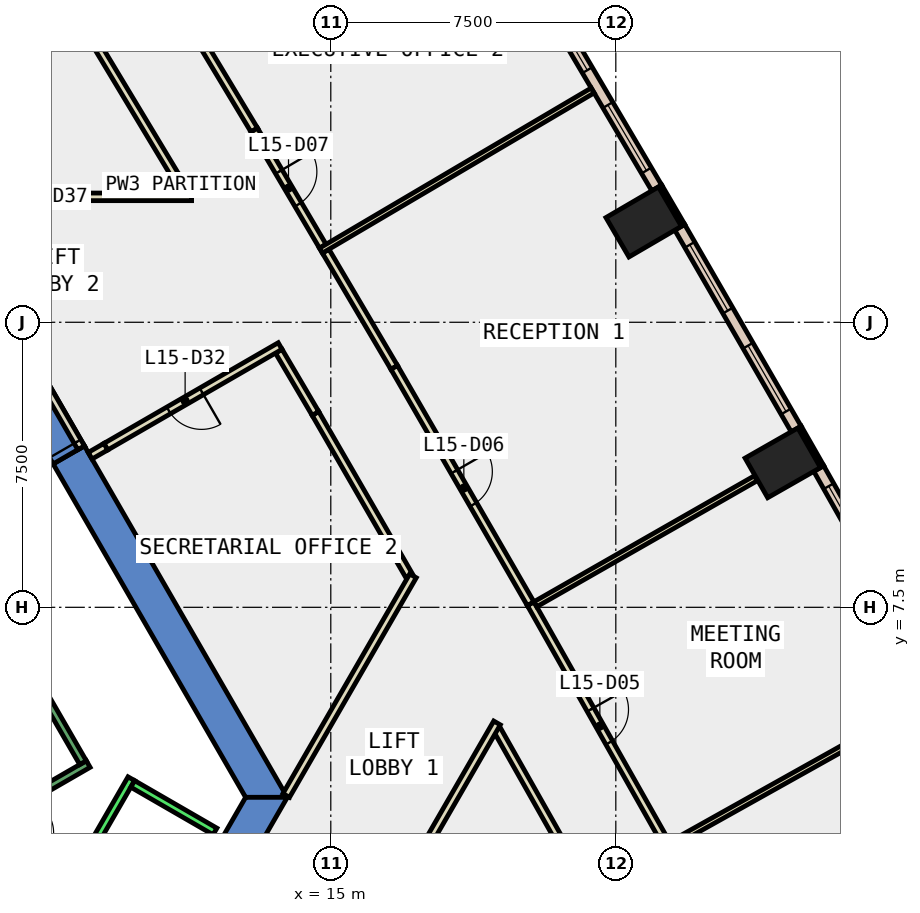
"""IFC4 building model, lengths in metres.
Left out: names, types, materials, properties, quantities, classifications, styles, units other than length and angle.
Written with IfcOpenShell. Run it as: python <this file> out.ifc"""

import sys

from ifc_helpers import new_model, si_unit, direction, frame, frame_2d, origin, origin_2d, place, context, subcontext, project, spatial, polyline, rectangle, outline, extrude, element, fill, save


model = new_model("IFC4")
c1 = context("Model", 3, precision=1e-05, world=origin(), true_north=direction((0.0, 1.0)))
c2 = subcontext(c1, "Body", "Model", "MODEL_VIEW")
j1 = project(units=[si_unit("LENGTHUNIT", "METRE"), si_unit("PLANEANGLEUNIT", "RADIAN")], contexts=[c1])
p1 = place(None, origin())
s1 = spatial("IfcSite", under=j1, at=p1, CompositionType="ELEMENT")
p2 = place(p1, origin())
s2 = spatial("IfcBuilding", under=s1, at=p2, CompositionType="ELEMENT")
p3 = place(p2, frame((0.0, 0.0, 72.8)))
s3 = spatial("IfcBuildingStorey", under=s2, at=p3, CompositionType="ELEMENT", Elevation=72.8)
for number, where, z_axis, x_axis in (
    (1, (26.894, 11.301, -0.4), (0.0, 0.0, 1.0), (-0.496, 0.869, 0.0)),
    (2, (23.234, 17.64, -0.4), (0.0, 0.0, 1.0), (-0.504, 0.864, 0.0)),
):
    element("IfcColumn", number, at=place(p3, frame(where, z_axis=z_axis, x_axis=x_axis)), inside=s3, PredefinedType="COLUMN", context=c2, shape_type="SweptSolid", body=[
        extrude(rectangle(XDim=1.2, YDim=1.6, at=origin_2d()), origin(), (0.0, 0.0, 1.0), 4.2),
    ])
p4 = place(p3, frame((0.0, 0.0, -0.4)))
e3 = element("IfcWall", 3, at=p4, inside=s3, PredefinedType="SHEAR", context=c2, shape_type="SweptSolid", body=[
    extrude(outline(polyline([(8.517, 11.748), (7.694, 11.273), (12.759, 2.5), (13.856, 2.5), (8.517, 11.748)])), origin(), (0.0, 0.0, 1.0), 4.2),
])
p5 = place(p3, frame((0.0, 0.0, 3.6)))
e4 = element("IfcWall", 4, at=p5, inside=s3, PredefinedType="SHEAR", context=c2, shape_type="SweptSolid", body=[
    extrude(outline(polyline([(7.517, 13.48), (6.695, 13.005), (7.694, 11.273), (8.517, 11.748), (7.517, 13.48)])), origin(), (0.0, 0.0, 1.0), 0.2),
])
p6 = place(p3, frame((0.0, 0.0, -0.4)))
e5 = element("IfcWall", 5, at=p6, inside=s3, PredefinedType="SHEAR", context=c2, shape_type="SweptSolid", body=[
    extrude(outline(polyline([(11.844, 0.915), (12.667, 0.44), (13.856, 2.5), (12.759, 2.5), (11.844, 0.915)])), origin(), (0.0, 0.0, 1.0), 4.2),
])
p7 = place(p3, frame((27.93, 11.201, 0.0), z_axis=(0.0, 0.0, 1.0), x_axis=(-0.495854054996, 0.868405870629, 0.0)))
e6 = element("IfcWall", 6, at=p7, inside=s3, PredefinedType="STANDARD", context=c2, shape_type="SweptSolid", body=[
    extrude(rectangle(XDim=1.2, YDim=0.1, at=frame_2d((0.6, 0.0))), origin(), (0.0, 0.0, 1.0), 3.8),
])
p8 = place(p3, frame((24.27, 17.551, 0.0), z_axis=(0.0, 0.0, 1.0), x_axis=(-0.504313844903, 0.863520437418, 0.0)))
e7 = element("IfcWall", 7, at=p8, inside=s3, PredefinedType="STANDARD", context=c2, shape_type="SweptSolid", body=[
    extrude(rectangle(XDim=1.2, YDim=0.1, at=frame_2d((0.6, 0.0))), origin(), (0.0, 0.0, 1.0), 3.8),
])
p9 = place(p3, frame((30.857, 5.814, 0.0), z_axis=(0.0, 0.0, 1.0), x_axis=(-0.492097935349, 0.870539845168, 0.0)))
e8 = element("IfcWall", 8, at=p9, inside=s3, PredefinedType="STANDARD", context=c2, shape_type="SweptSolid", body=[
    extrude(rectangle(XDim=6.131, YDim=0.3, at=frame_2d((3.065, 0.0))), origin(), (0.0, 0.0, 1.0), 3.8),
])
p10 = place(p9, frame((0.533, 0.0, 0.9)))
e9 = element("IfcOpeningElement", 9, at=p10, cuts=e8, PredefinedType="OPENING", context=c2, shape_type="SweptSolid", body=[
    extrude(rectangle(XDim=2.0, YDim=2.6, at=frame_2d((1.0, 1.3))), frame((0.0, 0.16, 0.0), z_axis=(0.0, -1.0, 0.0), x_axis=(1.0, 0.0, 0.0)), (0.0, 0.0, 1.0), 0.32),
])
p11 = place(p9, frame((3.598, 0.0, 0.9)))
e10 = element("IfcOpeningElement", 10, at=p11, cuts=e8, PredefinedType="OPENING", context=c2, shape_type="SweptSolid", body=[
    extrude(rectangle(XDim=2.0, YDim=2.6, at=frame_2d((1.0, 1.3))), frame((0.0, 0.16, 0.0), z_axis=(0.0, -1.0, 0.0), x_axis=(1.0, 0.0, 0.0)), (0.0, 0.0, 1.0), 0.32),
])
p12 = place(p3, frame((27.246, 12.191, 0.0), z_axis=(0.0, 0.0, 1.0), x_axis=(-0.499998239139, 0.866026420416, 0.0)))
e11 = element("IfcWall", 11, at=p12, inside=s3, PredefinedType="STANDARD", context=c2, shape_type="SweptSolid", body=[
    extrude(rectangle(XDim=6.13, YDim=0.3, at=frame_2d((3.065, 0.0))), origin(), (0.0, 0.0, 1.0), 3.8),
])
p13 = place(p12, frame((0.533, 0.0, 0.9)))
e12 = element("IfcOpeningElement", 12, at=p13, cuts=e11, PredefinedType="OPENING", context=c2, shape_type="SweptSolid", body=[
    extrude(rectangle(XDim=2.0, YDim=2.6, at=frame_2d((1.0, 1.3))), frame((0.0, 0.16, 0.0), z_axis=(0.0, -1.0, 0.0), x_axis=(1.0, 0.0, 0.0)), (0.0, 0.0, 1.0), 0.32),
])
p14 = place(p12, frame((3.598, 0.0, 0.9)))
e13 = element("IfcOpeningElement", 13, at=p14, cuts=e11, PredefinedType="OPENING", context=c2, shape_type="SweptSolid", body=[
    extrude(rectangle(XDim=2.0, YDim=2.6, at=frame_2d((1.0, 1.3))), frame((0.0, 0.16, 0.0), z_axis=(0.0, -1.0, 0.0), x_axis=(1.0, 0.0, 0.0)), (0.0, 0.0, 1.0), 0.32),
])
p15 = place(p3, frame((23.577, 18.534, 0.0), z_axis=(0.0, 0.0, 1.0), x_axis=(-0.507716058644, 0.861524465001, 0.0)))
e14 = element("IfcWall", 14, at=p15, inside=s3, PredefinedType="STANDARD", context=c2, shape_type="SweptSolid", body=[
    extrude(rectangle(XDim=6.131, YDim=0.3, at=frame_2d((3.065, 0.0))), origin(), (0.0, 0.0, 1.0), 3.8),
])
p16 = place(p15, frame((0.533, 0.0, 0.9)))
e15 = element("IfcOpeningElement", 15, at=p16, cuts=e14, PredefinedType="OPENING", context=c2, shape_type="SweptSolid", body=[
    extrude(rectangle(XDim=2.0, YDim=2.6, at=frame_2d((1.0, 1.3))), frame((0.0, 0.16, 0.0), z_axis=(0.0, -1.0, 0.0), x_axis=(1.0, 0.0, 0.0)), (0.0, 0.0, 1.0), 0.32),
])
p17 = place(p15, frame((3.598, 0.0, 0.9)))
e16 = element("IfcOpeningElement", 16, at=p17, cuts=e14, PredefinedType="OPENING", context=c2, shape_type="SweptSolid", body=[
    extrude(rectangle(XDim=2.0, YDim=2.6, at=frame_2d((1.0, 1.3))), frame((0.0, 0.16, 0.0), z_axis=(0.0, -1.0, 0.0), x_axis=(1.0, 0.0, 0.0)), (0.0, 0.0, 1.0), 0.32),
])
p18 = place(p3, frame((17.063, 8.328, 0.0), z_axis=(0.0, 0.0, 1.0), x_axis=(-0.499986575203, 0.866033154456, 0.0)))
e17 = element("IfcWall", 17, at=p18, inside=s3, PredefinedType="PARTITIONING", context=c2, shape_type="SweptSolid", body=[
    extrude(rectangle(XDim=4.934, YDim=0.2, at=frame_2d((2.467, 0.0))), origin(), (0.0, 0.0, 1.0), 3.8),
])
p19 = place(p3, frame((14.596, 12.601, 0.0), z_axis=(0.0, 0.0, 1.0), x_axis=(-0.507547610008, 0.861623713447, 0.0)))
e18 = element("IfcWall", 18, at=p19, inside=s3, PredefinedType="PARTITIONING", context=c2, shape_type="SweptSolid", body=[
    extrude(rectangle(XDim=1.901, YDim=0.2, at=frame_2d((0.95, 0.0))), origin(), (0.0, 0.0, 1.0), 3.8),
])
p20 = place(p3, frame((13.667, 14.375, 0.0), z_axis=(0.0, 0.0, 1.0), x_axis=(-0.866016748302, -0.500014991436, 0.0)))
e19 = element("IfcWall", 19, at=p20, inside=s3, PredefinedType="PARTITIONING", context=c2, shape_type="SweptSolid", body=[
    extrude(rectangle(XDim=5.298, YDim=0.2, at=frame_2d((2.649, 0.0))), origin(), (0.0, 0.0, 1.0), 3.8),
])
p21 = place(p20, frame((2.387, 0.0, 0.0)))
e20 = element("IfcOpeningElement", 20, at=p21, cuts=e19, PredefinedType="OPENING", context=c2, shape_type="SweptSolid", body=[
    extrude(rectangle(XDim=1.0, YDim=2.1, at=frame_2d((0.5, 1.05))), frame((0.0, 0.11, 0.0), z_axis=(0.0, -1.0, 0.0), x_axis=(1.0, 0.0, 0.0)), (0.0, 0.0, 1.0), 0.22),
])
p22 = place(p3, frame((11.186, 18.386, 0.0), z_axis=(0.0, 0.0, 1.0), x_axis=(-0.507247363226, 0.861800506208, 0.0)))
e21 = element("IfcWall", 21, at=p22, inside=s3, PredefinedType="PARTITIONING", context=c2, shape_type="SweptSolid", body=[
    extrude(rectangle(XDim=0.516, YDim=0.2, at=frame_2d((0.258, 0.0))), origin(), (0.0, 0.0, 1.0), 3.8),
])
p23 = place(p3, frame((10.924, 18.831, 0.0), z_axis=(0.0, 0.0, 1.0), x_axis=(-0.515797941416, 0.856710268195, 0.0)))
e22 = element("IfcWall", 22, at=p23, inside=s3, PredefinedType="PARTITIONING", context=c2, shape_type="SweptSolid", body=[
    extrude(rectangle(XDim=6.283, YDim=0.2, at=frame_2d((3.142, 0.0))), origin(), (0.0, 0.0, 1.0), 3.8),
])
p24 = place(p3, frame((21.77, 0.046, 0.0), z_axis=(0.0, 0.0, 1.0), x_axis=(-0.492148137455, 0.870511465059, 0.0)))
e23 = element("IfcWall", 23, at=p24, inside=s3, PredefinedType="PARTITIONING", context=c2, shape_type="SweptSolid", body=[
    extrude(rectangle(XDim=4.868, YDim=0.2, at=frame_2d((2.434, 0.0))), origin(), (0.0, 0.0, 1.0), 3.8),
])
p25 = place(p3, frame((20.259, 7.596, 0.0), z_axis=(0.0, 0.0, 1.0), x_axis=(0.492021755503, -0.870582903641, 0.0)))
e24 = element("IfcWall", 24, at=p25, inside=s3, PredefinedType="PARTITIONING", context=c2, shape_type="SweptSolid", body=[
    extrude(rectangle(XDim=7.251, YDim=0.2, at=frame_2d((3.626, 0.0))), origin(), (0.0, 0.0, 1.0), 3.8),
])
p26 = place(p25, frame((3.201, 0.0, 0.0)))
e25 = element("IfcOpeningElement", 25, at=p26, cuts=e24, PredefinedType="OPENING", context=c2, shape_type="SweptSolid", body=[
    extrude(rectangle(XDim=1.0, YDim=2.1, at=frame_2d((0.5, 1.05))), frame((0.0, 0.11, 0.0), z_axis=(0.0, -1.0, 0.0), x_axis=(1.0, 0.0, 0.0)), (0.0, 0.0, 1.0), 0.22),
])
p27 = place(p3, frame((14.865, 16.871, 0.0), z_axis=(0.0, 0.0, 1.0), x_axis=(0.507839876831, -0.861451484125, 0.0)))
e26 = element("IfcWall", 26, at=p27, inside=s3, PredefinedType="PARTITIONING", context=c2, shape_type="SweptSolid", body=[
    extrude(rectangle(XDim=3.552, YDim=0.2, at=frame_2d((1.776, 0.0))), origin(), (0.0, 0.0, 1.0), 3.8),
])
p28 = place(p3, frame((16.669, 13.811, 0.0), z_axis=(0.0, 0.0, 1.0), x_axis=(0.500027672765, -0.866009426316, 0.0)))
e27 = element("IfcWall", 27, at=p28, inside=s3, PredefinedType="PARTITIONING", context=c2, shape_type="SweptSolid", body=[
    extrude(rectangle(XDim=7.178, YDim=0.2, at=frame_2d((3.589, 0.0))), origin(), (0.0, 0.0, 1.0), 3.8),
])
p29 = place(p28, frame((3.164, 0.0, 0.0)))
e28 = element("IfcOpeningElement", 28, at=p29, cuts=e27, PredefinedType="OPENING", context=c2, shape_type="SweptSolid", body=[
    extrude(rectangle(XDim=1.0, YDim=2.1, at=frame_2d((0.5, 1.05))), frame((0.0, 0.11, 0.0), z_axis=(0.0, -1.0, 0.0), x_axis=(1.0, 0.0, 0.0)), (0.0, 0.0, 1.0), 0.22),
])
p30 = place(p3, frame((11.156, 23.1, 0.0), z_axis=(0.0, 0.0, 1.0), x_axis=(0.515628270719, -0.856812398623, 0.0)))
e29 = element("IfcWall", 29, at=p30, inside=s3, PredefinedType="PARTITIONING", context=c2, shape_type="SweptSolid", body=[
    extrude(rectangle(XDim=3.549, YDim=0.2, at=frame_2d((1.775, 0.0))), origin(), (0.0, 0.0, 1.0), 3.8),
])
p31 = place(p3, frame((12.986, 20.059, 0.0), z_axis=(0.0, 0.0, 1.0), x_axis=(0.507876424268, -0.861429937762, 0.0)))
e30 = element("IfcWall", 30, at=p31, inside=s3, PredefinedType="PARTITIONING", context=c2, shape_type="SweptSolid", body=[
    extrude(rectangle(XDim=3.55, YDim=0.2, at=frame_2d((1.775, 0.0))), origin(), (0.0, 0.0, 1.0), 3.8),
])
p32 = place(p31, frame((1.275, 0.0, 0.0)))
e31 = element("IfcOpeningElement", 31, at=p32, cuts=e30, PredefinedType="OPENING", context=c2, shape_type="SweptSolid", body=[
    extrude(rectangle(XDim=1.0, YDim=2.1, at=frame_2d((0.5, 1.05))), frame((0.0, 0.11, 0.0), z_axis=(0.0, -1.0, 0.0), x_axis=(1.0, 0.0, 0.0)), (0.0, 0.0, 1.0), 0.22),
])
p33 = place(p3, frame((6.25, 1.894, 0.0), z_axis=(0.0, 0.0, 1.0), x_axis=(0.866043184279, -0.499969202016, 0.0)))
e32 = element("IfcWall", 32, at=p33, inside=s3, PredefinedType="PARTITIONING", context=c2, shape_type="SweptSolid", body=[
    extrude(rectangle(XDim=2.084, YDim=0.2, at=frame_2d((1.042, 0.0))), origin(), (0.0, 0.0, 1.0), 3.8),
])
p34 = place(p33, frame((0.642, 0.0, 0.0)))
e33 = element("IfcOpeningElement", 33, at=p34, cuts=e32, PredefinedType="OPENING", context=c2, shape_type="SweptSolid", body=[
    extrude(rectangle(XDim=0.9, YDim=2.1, at=frame_2d((0.45, 1.05))), frame((0.0, 0.11, 0.0), z_axis=(0.0, -1.0, 0.0), x_axis=(1.0, 0.0, 0.0)), (0.0, 0.0, 1.0), 0.22),
])
p35 = place(p3, frame((13.827, 2.55, 0.0), z_axis=(0.0, 0.0, 1.0), x_axis=(0.500039204794, 0.866002767703, 0.0)))
e34 = element("IfcWall", 34, at=p35, inside=s3, PredefinedType="PARTITIONING", context=c2, shape_type="SweptSolid", body=[
    extrude(rectangle(XDim=6.672, YDim=0.2, at=frame_2d((3.336, 0.0))), origin(), (0.0, 0.0, 1.0), 3.8),
])
p36 = place(p3, frame((19.374, 4.458, 0.0), z_axis=(0.0, 0.0, 1.0), x_axis=(-0.499973880856, -0.866040483154, 0.0)))
e35 = element("IfcWall", 35, at=p36, inside=s3, PredefinedType="PARTITIONING", context=c2, shape_type="SweptSolid", body=[
    extrude(rectangle(XDim=13.113, YDim=0.2, at=frame_2d((6.556, 0.0))), origin(), (0.0, 0.0, 1.0), 3.8),
])
p37 = place(p3, frame((23.951, 1.266, 0.0), z_axis=(0.0, 0.0, 1.0), x_axis=(0.872786908026, 0.488101437385, 0.0)))
e36 = element("IfcWall", 36, at=p37, inside=s3, PredefinedType="PARTITIONING", context=c2, shape_type="SweptSolid", body=[
    extrude(rectangle(XDim=6.681, YDim=0.15, at=frame_2d((3.34, 0.0))), origin(), (0.0, 0.0, 1.0), 3.8),
])
p38 = place(p3, frame((20.382, 7.58, 0.0), z_axis=(0.0, 0.0, 1.0), x_axis=(0.868256636797, 0.496115321935, 0.0)))
e37 = element("IfcWall", 37, at=p38, inside=s3, PredefinedType="PARTITIONING", context=c2, shape_type="SweptSolid", body=[
    extrude(rectangle(XDim=6.68, YDim=0.15, at=frame_2d((3.34, 0.0))), origin(), (0.0, 0.0, 1.0), 3.8),
])
p39 = place(p3, frame((14.741, 16.885, 0.0), z_axis=(0.0, 0.0, 1.0), x_axis=(0.861505144806, 0.507748840936, 0.0)))
e38 = element("IfcWall", 38, at=p39, inside=s3, PredefinedType="PARTITIONING", context=c2, shape_type="SweptSolid", body=[
    extrude(rectangle(XDim=8.3, YDim=0.15, at=frame_2d((4.15, 0.0))), origin(), (0.0, 0.0, 1.0), 3.8),
])
p40 = place(p3, frame((8.43, 11.698, 0.0), z_axis=(0.0, 0.0, 1.0), x_axis=(-0.50002537861, 0.866010750942, 0.0)))
e39 = element("IfcWall", 39, at=p40, inside=s3, PredefinedType="PARTITIONING", context=c2, shape_type="SweptSolid", body=[
    extrude(rectangle(XDim=2.0, YDim=0.2, at=frame_2d((1.0, 0.0))), origin(), (0.0, 0.0, 1.0), 2.4),
])
p41 = place(p40, frame((0.19, 0.0, 0.0)))
e40 = element("IfcOpeningElement", 40, at=p41, cuts=e39, PredefinedType="OPENING", context=c2, shape_type="SweptSolid", body=[
    extrude(rectangle(XDim=1.8, YDim=2.1, at=frame_2d((0.9, 1.05))), frame((0.0, 0.11, 0.0), z_axis=(0.0, -1.0, 0.0), x_axis=(1.0, 0.0, 0.0)), (0.0, 0.0, 1.0), 0.22),
])
p42 = place(p3, frame((0.4, 18.3, 0.0), z_axis=(0.0, 0.0, 1.0), x_axis=(1.0, 0.0, 0.0)))
e41 = element("IfcWall", 41, at=p42, inside=s3, PredefinedType="PARTITIONING", context=c2, shape_type="SweptSolid", body=[
    extrude(rectangle(XDim=10.937, YDim=0.2, at=frame_2d((5.469, 0.0))), origin(), (0.0, 0.0, 1.0), 3.8),
])
p43 = place(p42, frame((3.333, 0.0, 0.0)))
e42 = element("IfcOpeningElement", 42, at=p43, cuts=e41, PredefinedType="OPENING", context=c2, shape_type="SweptSolid", body=[
    extrude(rectangle(XDim=1.0, YDim=2.1, at=frame_2d((0.5, 1.05))), frame((0.0, 0.11, 0.0), z_axis=(0.0, -1.0, 0.0), x_axis=(1.0, 0.0, 0.0)), (0.0, 0.0, 1.0), 0.22),
])
p44 = place(p42, frame((4.433, 0.0, 0.0)))
e43 = element("IfcOpeningElement", 43, at=p44, cuts=e41, PredefinedType="OPENING", context=c2, shape_type="SweptSolid", body=[
    extrude(rectangle(XDim=1.0, YDim=2.1, at=frame_2d((0.5, 1.05))), frame((0.0, 0.11, 0.0), z_axis=(0.0, -1.0, 0.0), x_axis=(1.0, 0.0, 0.0)), (0.0, 0.0, 1.0), 0.22),
])
p45 = place(p3, frame((9.079, 11.726, 0.0), z_axis=(0.0, 0.0, 1.0), x_axis=(-0.865929261247, -0.500166486798, 0.0)))
e44 = element("IfcWall", 44, at=p45, inside=s3, PredefinedType="PARTITIONING", context=c2, shape_type="SweptSolid", body=[
    extrude(rectangle(XDim=0.476, YDim=0.2, at=frame_2d((0.238, 0.0))), origin(), (0.0, 0.0, 1.0), 2.4),
])
p46 = place(p3, frame((4.451, -6.19, 0.0), z_axis=(0.0, 0.0, 1.0), x_axis=(0.50000090737, 0.866024879913, 0.0)))
e45 = element("IfcWall", 45, at=p46, inside=s3, PredefinedType="STANDARD", context=c2, shape_type="SweptSolid", body=[
    extrude(rectangle(XDim=10.6, YDim=0.2, at=frame_2d((5.3, 0.0))), origin(), (0.0, 0.0, 1.0), 3.8),
])
p47 = place(p3, frame((9.788, 2.853, 0.0), z_axis=(0.0, 0.0, 1.0), x_axis=(0.865998541277, -0.500046524342, 0.0)))
e46 = element("IfcWall", 46, at=p47, inside=s3, PredefinedType="STANDARD", context=c2, shape_type="SweptSolid", body=[
    extrude(rectangle(XDim=2.5, YDim=0.2, at=frame_2d((1.25, 0.0))), origin(), (0.0, 0.0, 1.0), 3.8),
])
p48 = place(p3, frame((4.806, 1.176, 0.0), z_axis=(0.0, 0.0, 1.0), x_axis=(0.866059941101, 0.499940174841, 0.0)))
e47 = element("IfcWall", 47, at=p48, inside=s3, PredefinedType="STANDARD", context=c2, shape_type="SweptSolid", body=[
    extrude(rectangle(XDim=4.4, YDim=0.2, at=frame_2d((2.2, 0.0))), origin(), (0.0, 0.0, 1.0), 3.8),
])
p49 = place(p48, frame((1.65, 0.0, 0.0)))
e48 = element("IfcOpeningElement", 48, at=p49, cuts=e47, PredefinedType="OPENING", context=c2, shape_type="SweptSolid", body=[
    extrude(rectangle(XDim=1.1, YDim=2.2, at=frame_2d((0.55, 1.1))), frame((0.0, 0.11, 0.0), z_axis=(0.0, -1.0, 0.0), x_axis=(1.0, 0.0, 0.0)), (0.0, 0.0, 1.0), 0.22),
])
p50 = place(p3, frame((8.48, 3.412, 0.0), z_axis=(0.0, 0.0, 1.0), x_axis=(-0.499978703459, 0.866037698999, 0.0)))
e49 = element("IfcWall", 49, at=p50, inside=s3, PredefinedType="STANDARD", context=c2, shape_type="SweptSolid", body=[
    extrude(rectangle(XDim=6.9, YDim=0.2, at=frame_2d((3.45, 0.0))), origin(), (0.0, 0.0, 1.0), 3.8),
])
p51 = place(p11, origin())
e50 = element("IfcWindow", 50, at=p51, inside=s3, PartitioningType="SINGLE_PANEL", PredefinedType="WINDOW", context=c2, shape_type="SweptSolid", body=[
    extrude(rectangle(XDim=2.0, YDim=2.6, at=frame_2d((1.0, 1.3))), frame((0.0, 0.03, 0.0), z_axis=(0.0, -1.0, 0.0), x_axis=(1.0, 0.0, 0.0)), (0.0, 0.0, 1.0), 0.06),
])
fill(e10, e50)
p52 = place(p13, origin())
e51 = element("IfcWindow", 51, at=p52, inside=s3, PartitioningType="SINGLE_PANEL", PredefinedType="WINDOW", context=c2, shape_type="SweptSolid", body=[
    extrude(rectangle(XDim=2.0, YDim=2.6, at=frame_2d((1.0, 1.3))), frame((0.0, 0.03, 0.0), z_axis=(0.0, -1.0, 0.0), x_axis=(1.0, 0.0, 0.0)), (0.0, 0.0, 1.0), 0.06),
])
fill(e12, e51)
p53 = place(p14, origin())
e52 = element("IfcWindow", 52, at=p53, inside=s3, PartitioningType="SINGLE_PANEL", PredefinedType="WINDOW", context=c2, shape_type="SweptSolid", body=[
    extrude(rectangle(XDim=2.0, YDim=2.6, at=frame_2d((1.0, 1.3))), frame((0.0, 0.03, 0.0), z_axis=(0.0, -1.0, 0.0), x_axis=(1.0, 0.0, 0.0)), (0.0, 0.0, 1.0), 0.06),
])
fill(e13, e52)
p54 = place(p16, origin())
e53 = element("IfcWindow", 53, at=p54, inside=s3, PartitioningType="SINGLE_PANEL", PredefinedType="WINDOW", context=c2, shape_type="SweptSolid", body=[
    extrude(rectangle(XDim=2.0, YDim=2.6, at=frame_2d((1.0, 1.3))), frame((0.0, 0.03, 0.0), z_axis=(0.0, -1.0, 0.0), x_axis=(1.0, 0.0, 0.0)), (0.0, 0.0, 1.0), 0.06),
])
fill(e15, e53)
p55 = place(p17, origin())
e54 = element("IfcWindow", 54, at=p55, inside=s3, PartitioningType="SINGLE_PANEL", PredefinedType="WINDOW", context=c2, shape_type="SweptSolid", body=[
    extrude(rectangle(XDim=2.0, YDim=2.6, at=frame_2d((1.0, 1.3))), frame((0.0, 0.03, 0.0), z_axis=(0.0, -1.0, 0.0), x_axis=(1.0, 0.0, 0.0)), (0.0, 0.0, 1.0), 0.06),
])
fill(e16, e54)
p56 = place(p26, origin())
e55 = element("IfcDoor", 55, at=p56, inside=s3, OperationType="SINGLE_SWING_LEFT", PredefinedType="DOOR", context=c2, shape_type="SweptSolid", body=[
    extrude(rectangle(XDim=1.0, YDim=2.1, at=frame_2d((0.5, 1.05))), frame((0.0, 0.025, 0.0), z_axis=(0.0, -1.0, 0.0), x_axis=(1.0, 0.0, 0.0)), (0.0, 0.0, 1.0), 0.05),
])
fill(e25, e55)
p57 = place(p29, origin())
e56 = element("IfcDoor", 56, at=p57, inside=s3, OperationType="SINGLE_SWING_LEFT", PredefinedType="DOOR", context=c2, shape_type="SweptSolid", body=[
    extrude(rectangle(XDim=1.0, YDim=2.1, at=frame_2d((0.5, 1.05))), frame((0.0, 0.025, 0.0), z_axis=(0.0, -1.0, 0.0), x_axis=(1.0, 0.0, 0.0)), (0.0, 0.0, 1.0), 0.05),
])
fill(e28, e56)
p58 = place(p32, origin())
e57 = element("IfcDoor", 57, at=p58, inside=s3, OperationType="SINGLE_SWING_RIGHT", PredefinedType="DOOR", context=c2, shape_type="SweptSolid", body=[
    extrude(rectangle(XDim=1.0, YDim=2.1, at=frame_2d((0.5, 1.05))), frame((0.0, 0.025, 0.0), z_axis=(0.0, -1.0, 0.0), x_axis=(1.0, 0.0, 0.0)), (0.0, 0.0, 1.0), 0.05),
])
fill(e31, e57)
p59 = place(p21, origin())
e58 = element("IfcDoor", 58, at=p59, inside=s3, OperationType="SINGLE_SWING_LEFT", PredefinedType="DOOR", context=c2, shape_type="SweptSolid", body=[
    extrude(rectangle(XDim=1.0, YDim=2.1, at=frame_2d((0.5, 1.05))), frame((0.0, 0.025, 0.0), z_axis=(0.0, -1.0, 0.0), x_axis=(1.0, 0.0, 0.0)), (0.0, 0.0, 1.0), 0.05),
])
fill(e20, e58)
p60 = place(p41, origin())
e59 = element("IfcDoor", 59, at=p60, inside=s3, OperationType="DOUBLE_DOOR_SINGLE_SWING", PredefinedType="DOOR", context=c2, shape_type="SweptSolid", body=[
    extrude(rectangle(XDim=1.8, YDim=2.1, at=frame_2d((0.9, 1.05))), frame((0.0, 0.025, 0.0), z_axis=(0.0, -1.0, 0.0), x_axis=(1.0, 0.0, 0.0)), (0.0, 0.0, 1.0), 0.05),
])
fill(e40, e59)
save(model, sys.argv[1])
